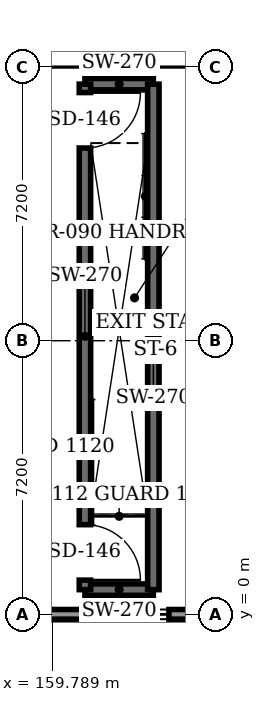
"""IFC4 building model, lengths in metres.
Left out: names, types, materials, properties, quantities, classifications, styles, units other than length and angle.
Written with IfcOpenShell. Run it as: python <this file> out.ifc"""

import sys

from ifc_helpers import new_model, si_unit, direction, frame, frame_2d, origin, place, context, subcontext, project, spatial, rectangle, extrude, element, fill, save


model = new_model("IFC4")
c1 = context("Model", 3, precision=1e-05, world=origin(), true_north=direction((0.0, 1.0)))
c2 = subcontext(c1, "Body", "Model", "MODEL_VIEW")
j1 = project(units=[si_unit("LENGTHUNIT", "METRE"), si_unit("PLANEANGLEUNIT", "RADIAN")], contexts=[c1])
p1 = place(None, origin())
s1 = spatial("IfcSite", under=j1, at=p1, CompositionType="ELEMENT")
p2 = place(p1, origin())
s2 = spatial("IfcBuilding", under=s1, at=p2, CompositionType="ELEMENT")
p3 = place(p2, frame((0.0, 0.0, 6.0)))
s3 = spatial("IfcBuildingStorey", under=s2, at=p3, CompositionType="ELEMENT", Elevation=6.0)
p4 = place(p3, frame((165.6, 0.0, 0.0), z_axis=(0.0, 0.0, 1.0), x_axis=(-1.0, 0.0, 0.0)))
e1 = element("IfcWall", 1, at=p4, inside=s3, PredefinedType="STANDARD", context=c2, shape_type="SweptSolid", body=[
    extrude(rectangle(XDim=21.6, YDim=0.255, at=frame_2d((10.8, 0.0))), origin(), (0.0, 0.0, 1.0), 3.247),
])
p5 = place(p4, frame((17.14, 0.0, 1.15)))
e2 = element("IfcOpeningElement", 2, at=p5, cuts=e1, PredefinedType="OPENING", context=c2, shape_type="SweptSolid", body=[
    extrude(rectangle(XDim=1.56, YDim=1.5, at=frame_2d((0.78, 0.75))), frame((0.0, 0.137, 0.0), z_axis=(0.0, -1.0, 0.0), x_axis=(1.0, 0.0, 0.0)), (0.0, 0.0, 1.0), 0.275),
])
p6 = place(p4, frame((2.74, 0.0, 1.15)))
e3 = element("IfcOpeningElement", 3, at=p6, cuts=e1, PredefinedType="OPENING", context=c2, shape_type="SweptSolid", body=[
    extrude(rectangle(XDim=1.56, YDim=1.5, at=frame_2d((0.78, 0.75))), frame((0.0, 0.137, 0.0), z_axis=(0.0, -1.0, 0.0), x_axis=(1.0, 0.0, 0.0)), (0.0, 0.0, 1.0), 0.275),
])
for number, where, z_axis, x_axis in (
    (4, (160.65, 0.65, 0.0), (0.0, 0.0, 1.0), (1.0, 0.0, 0.0)),
    (5, (162.45, 13.95, 0.0), (0.0, 0.0, 1.0), (-1.0, 0.0, 0.0)),
):
    element("IfcWall", number, at=place(p3, frame(where, z_axis=z_axis, x_axis=x_axis)), inside=s3, PredefinedType="SHEAR", context=c2, shape_type="SweptSolid", body=[
        extrude(rectangle(XDim=1.8, YDim=0.3, at=frame_2d((0.9, 0.0))), origin(), (0.0, 0.0, 1.0), 3.94),
    ])
p7 = place(p3, frame((160.65, 13.95, 0.0), z_axis=(0.0, 0.0, 1.0), x_axis=(0.0, -1.0, 0.0)))
e6 = element("IfcWall", 6, at=p7, inside=s3, PredefinedType="SHEAR", context=c2, shape_type="SweptSolid", body=[
    extrude(rectangle(XDim=13.3, YDim=0.3, at=frame_2d((6.65, 0.0))), origin(), (0.0, 0.0, 1.0), 3.94),
])
p8 = place(p7, frame((11.59, 0.0, 0.0)))
e7 = element("IfcOpeningElement", 7, at=p8, cuts=e6, PredefinedType="OPENING", context=c2, shape_type="SweptSolid", body=[
    extrude(rectangle(XDim=1.46, YDim=2.24, at=frame_2d((0.73, 1.12))), frame((0.0, 0.16, 0.0), z_axis=(0.0, -1.0, 0.0), x_axis=(1.0, 0.0, 0.0)), (0.0, 0.0, 1.0), 0.32),
])
p9 = place(p7, frame((0.22, 0.0, 0.0)))
e8 = element("IfcOpeningElement", 8, at=p9, cuts=e6, PredefinedType="OPENING", context=c2, shape_type="SweptSolid", body=[
    extrude(rectangle(XDim=1.46, YDim=2.24, at=frame_2d((0.73, 1.12))), frame((0.0, 0.16, 0.0), z_axis=(0.0, -1.0, 0.0), x_axis=(1.0, 0.0, 0.0)), (0.0, 0.0, 1.0), 0.32),
])
p10 = place(p3, frame((162.45, 0.65, 0.0), z_axis=(0.0, 0.0, 1.0), x_axis=(0.0, 1.0, 0.0)))
e9 = element("IfcWall", 9, at=p10, inside=s3, PredefinedType="SHEAR", context=c2, shape_type="SweptSolid", body=[
    extrude(rectangle(XDim=13.3, YDim=0.3, at=frame_2d((6.65, 0.0))), origin(), (0.0, 0.0, 1.0), 3.94),
])
p11 = place(p6, origin())
e10 = element("IfcWindow", 10, at=p11, inside=s3, PartitioningType="SINGLE_PANEL", PredefinedType="WINDOW", context=c2, shape_type="SweptSolid", body=[
    extrude(rectangle(XDim=1.56, YDim=1.5, at=frame_2d((0.78, 0.75))), frame((0.0, 0.03, 0.0), z_axis=(0.0, -1.0, 0.0), x_axis=(1.0, 0.0, 0.0)), (0.0, 0.0, 1.0), 0.06),
])
fill(e3, e10)
p12 = place(p8, origin())
e11 = element("IfcDoor", 11, at=p12, inside=s3, OperationType="SINGLE_SWING_RIGHT", PredefinedType="DOOR", context=c2, shape_type="SweptSolid", body=[
    extrude(rectangle(XDim=1.46, YDim=2.24, at=frame_2d((0.73, 1.12))), frame((0.0, 0.025, 0.0), z_axis=(0.0, -1.0, 0.0), x_axis=(1.0, 0.0, 0.0)), (0.0, 0.0, 1.0), 0.05),
])
fill(e7, e11)
p13 = place(p9, origin())
e12 = element("IfcDoor", 12, at=p13, inside=s3, OperationType="SINGLE_SWING_LEFT", PredefinedType="DOOR", context=c2, shape_type="SweptSolid", body=[
    extrude(rectangle(XDim=1.46, YDim=2.24, at=frame_2d((0.73, 1.12))), frame((0.0, 0.025, 0.0), z_axis=(0.0, -1.0, 0.0), x_axis=(1.0, 0.0, 0.0)), (0.0, 0.0, 1.0), 0.05),
])
fill(e8, e12)
save(model, sys.argv[1])
